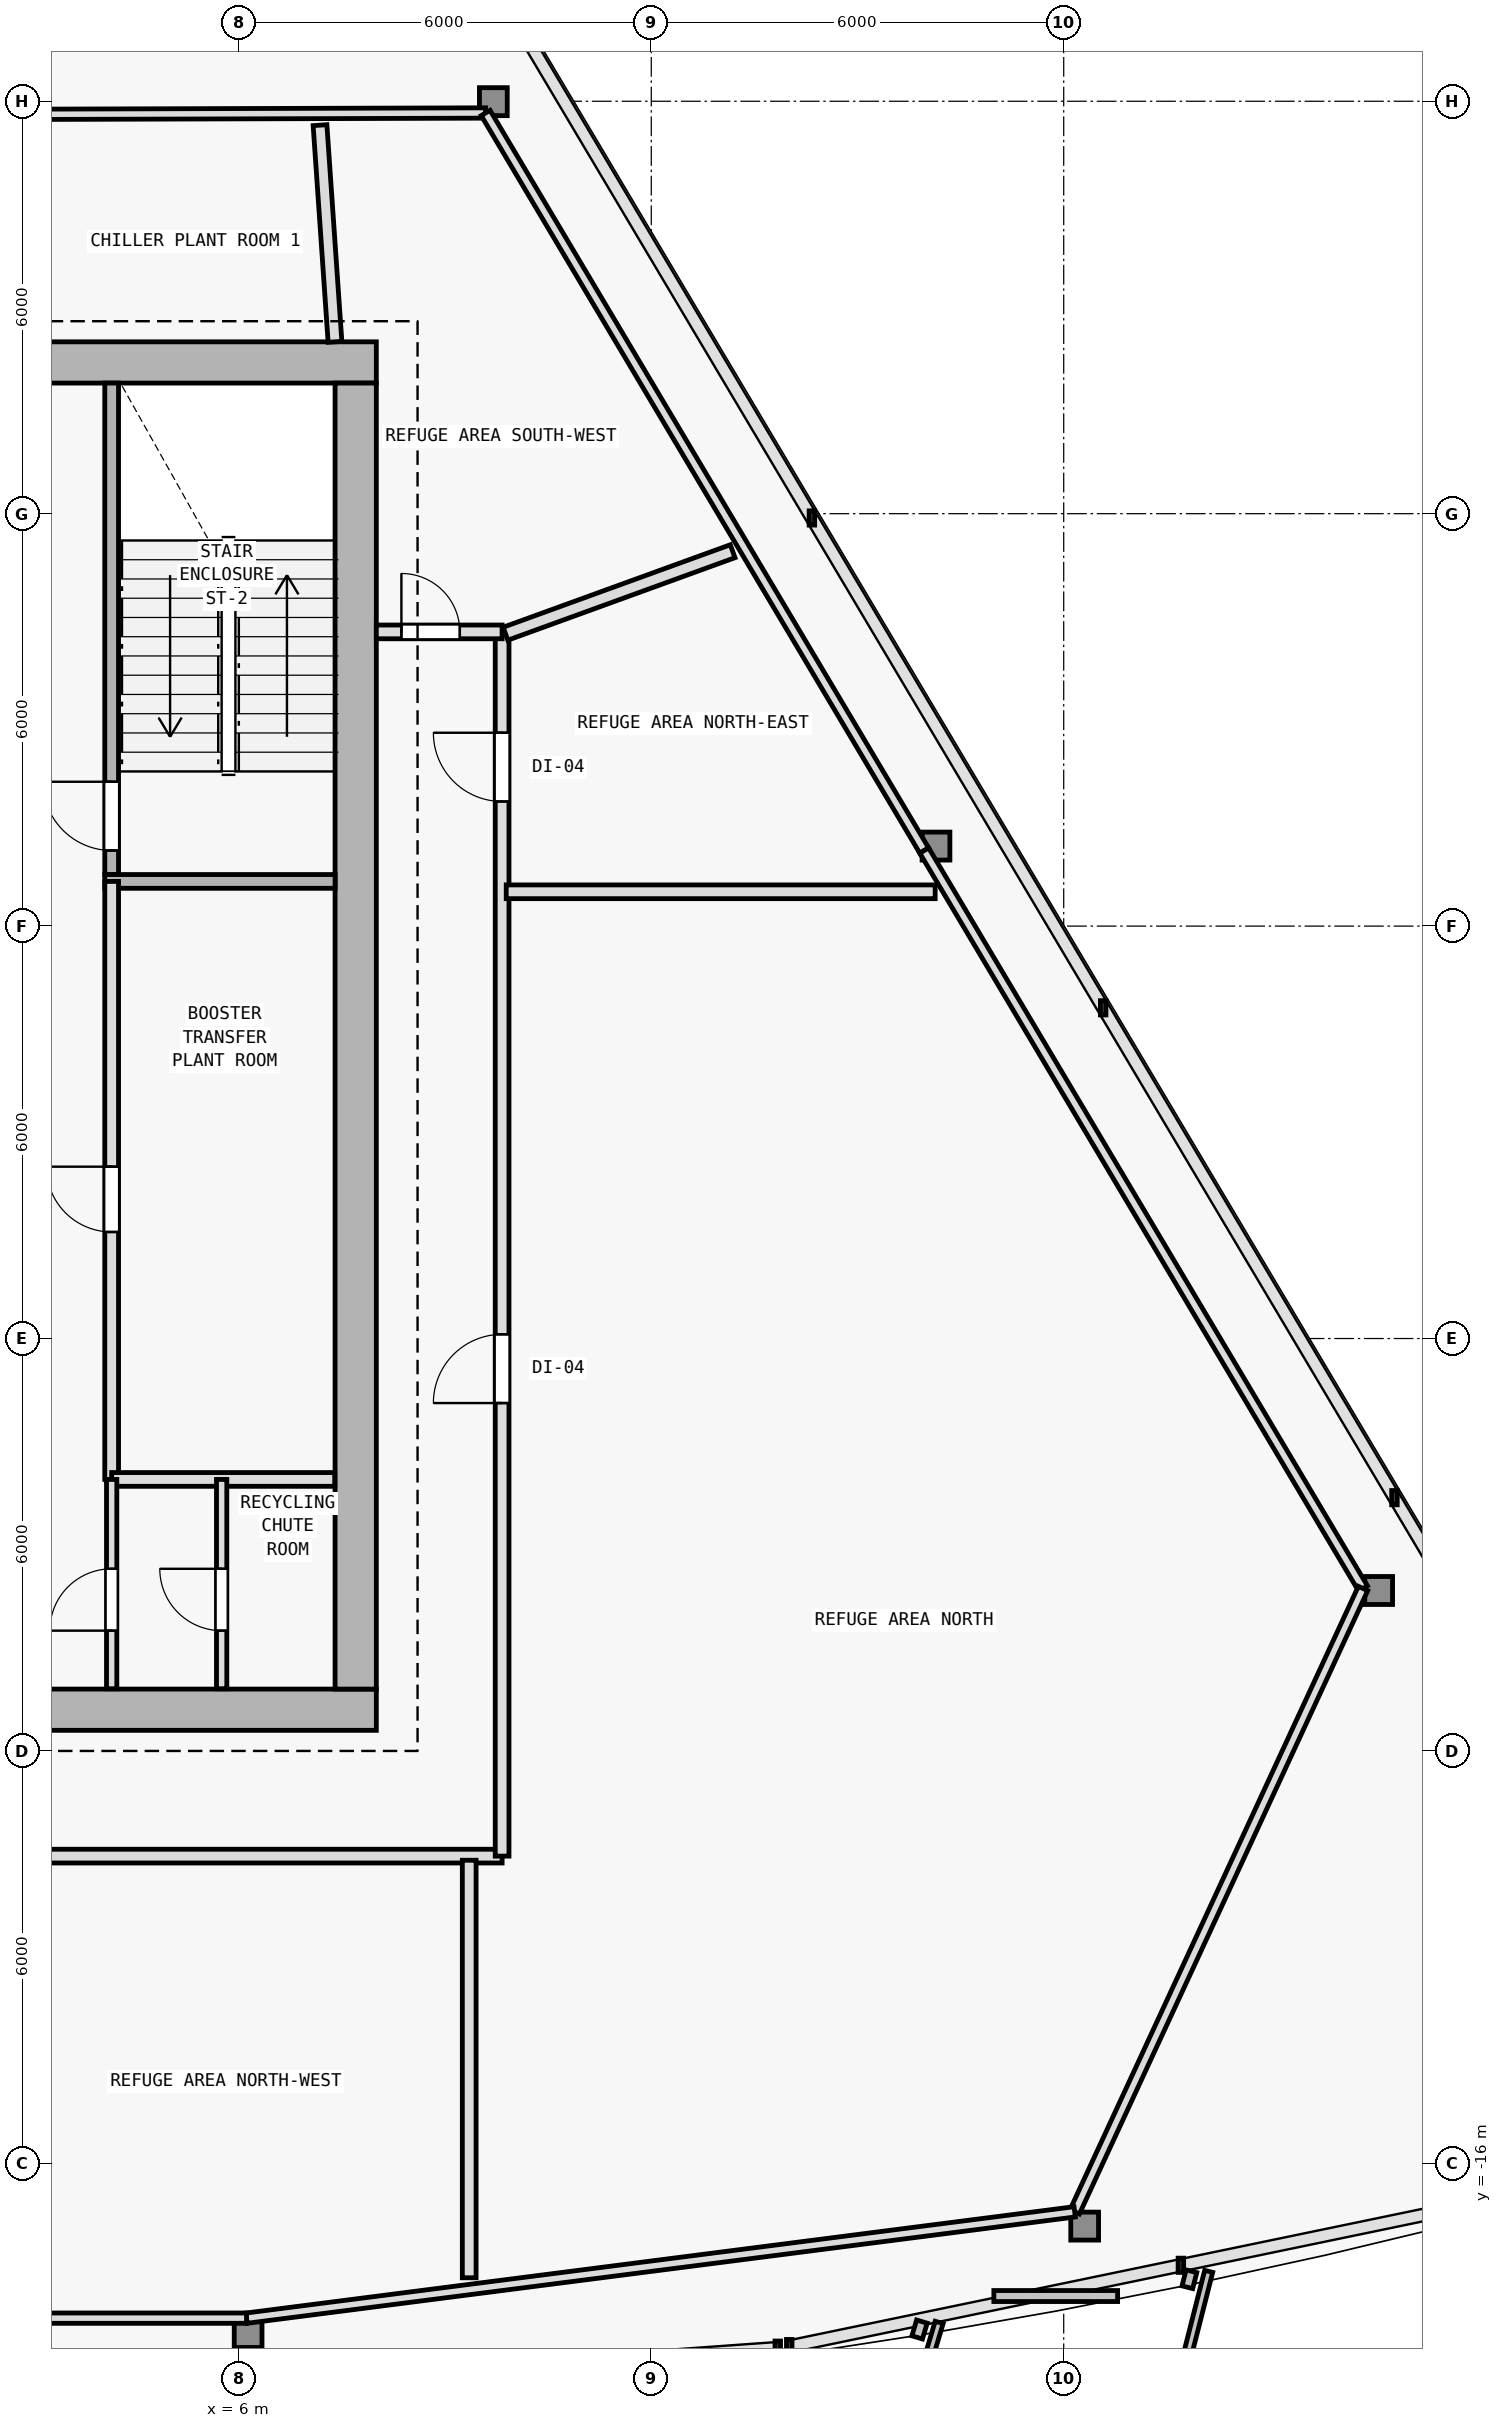
"""IFC4 building model, lengths in metres.
Left out: names, types, materials, properties, quantities, classifications, styles, units other than length and angle.
Written with IfcOpenShell. Run it as: python <this file> out.ifc"""

import sys

from ifc_helpers import new_model, si_unit, direction, frame, frame_2d, origin, origin_2d, place, context, subcontext, project, spatial, rectangle, i_section, extrude, element, fill, save


model = new_model("IFC4")
c1 = context("Model", 3, precision=1e-05, world=origin(), true_north=direction((0.0, 1.0)))
c2 = subcontext(c1, "Body", "Model", "MODEL_VIEW")
j1 = project(units=[si_unit("LENGTHUNIT", "METRE"), si_unit("PLANEANGLEUNIT", "RADIAN")], contexts=[c1])
p1 = place(None, origin())
s1 = spatial("IfcSite", under=j1, at=p1, CompositionType="ELEMENT")
p2 = place(p1, origin())
s2 = spatial("IfcBuilding", under=s1, at=p2, CompositionType="ELEMENT")
p3 = place(p2, frame((0.0, 0.0, 129.3)))
s3 = spatial("IfcBuildingStorey", under=s2, at=p3, CompositionType="ELEMENT", Elevation=129.3)
for number, where, z_axis, x_axis in (
    (1, (7.7, -9.4, 0.0), (0.0, 0.0, 1.0), (1.0, 0.0, 0.0)),
    (2, (7.7, 10.2, 0.0), (0.0, 0.0, 1.0), (1.0, 0.0, 0.0)),
    (3, (7.7, 0.4, 0.0), (0.0, 0.0, 1.0), (1.0, 0.0, 0.0)),
):
    element("IfcColumn", number, at=place(p3, frame(where, z_axis=z_axis, x_axis=x_axis)), inside=s3, PredefinedType="COLUMN", context=c2, shape_type="SweptSolid", body=[
        extrude(i_section(OverallWidth=0.409, OverallDepth=0.425, WebThickness=0.021, FlangeThickness=0.034, FilletRadius=0.015, at=origin_2d()), origin(), (0.0, 0.0, 1.0), 4.8),
    ])
p4 = place(p3, frame((6.135, -18.475, 0.005), z_axis=(-0.005197947592, 0.026448380393, 0.999636666252), x_axis=(-0.981229659911, -0.192842823335, 0.0)))
e4 = element("IfcColumn", 4, at=p4, inside=s3, PredefinedType="COLUMN", context=c2, shape_type="SweptSolid", body=[
    extrude(i_section(OverallWidth=0.404, OverallDepth=0.407, WebThickness=0.017, FlangeThickness=0.028, FilletRadius=0.015, at=origin_2d()), origin(), (0.0, 0.0, 1.0), 4.791),
])
p5 = place(p3, frame((18.305, -16.913, 0.005), z_axis=(-0.015439857484, 0.025121616302, 0.999565163056), x_axis=(-0.851954850327, -0.523615252838, 0.0)))
e5 = element("IfcColumn", 5, at=p5, inside=s3, PredefinedType="COLUMN", context=c2, shape_type="SweptSolid", body=[
    extrude(i_section(OverallWidth=0.404, OverallDepth=0.407, WebThickness=0.017, FlangeThickness=0.028, FilletRadius=0.015, at=origin_2d()), origin(), (0.0, 0.0, 1.0), 4.791),
])
p6 = place(p3, frame((22.582, -7.666, 0.005), z_axis=(-0.019569536318, 0.016206022264, 0.999677146928), x_axis=(-0.637813971185, -0.770190455771, 0.0)))
e6 = element("IfcColumn", 6, at=p6, inside=s3, PredefinedType="COLUMN", context=c2, shape_type="SweptSolid", body=[
    extrude(i_section(OverallWidth=0.404, OverallDepth=0.407, WebThickness=0.017, FlangeThickness=0.028, FilletRadius=0.015, at=origin_2d()), origin(), (0.0, 0.0, 1.0), 4.791),
])
p7 = place(p3, frame((16.142, 3.164, 0.005), z_axis=(-0.014170315402, 0.007187102416, 0.999873765893), x_axis=(-0.452339157861, -0.891845999187, 0.0)))
e7 = element("IfcColumn", 7, at=p7, inside=s3, PredefinedType="COLUMN", context=c2, shape_type="SweptSolid", body=[
    extrude(i_section(OverallWidth=0.404, OverallDepth=0.407, WebThickness=0.017, FlangeThickness=0.028, FilletRadius=0.015, at=origin_2d()), origin(), (0.0, 0.0, 1.0), 4.79),
])
p8 = place(p3, frame((9.702, 13.994, 0.005), z_axis=(-0.008767998861, -0.001937116027, 0.999959684076), x_axis=(0.215728093413, -0.976453475447, 0.0)))
e8 = element("IfcColumn", 8, at=p8, inside=s3, PredefinedType="COLUMN", context=c2, shape_type="SweptSolid", body=[
    extrude(i_section(OverallWidth=0.404, OverallDepth=0.407, WebThickness=0.017, FlangeThickness=0.028, FilletRadius=0.015, at=origin_2d()), origin(), (0.0, 0.0, 1.0), 4.789),
])
p9 = place(p3, frame((-8.0, -9.4, 0.0), z_axis=(0.0, 0.0, 1.0), x_axis=(1.0, 0.0, 0.0)))
e9 = element("IfcWall", 9, at=p9, inside=s3, PredefinedType="SHEAR", context=c2, shape_type="SweptSolid", body=[
    extrude(rectangle(XDim=16.0, YDim=0.6, at=frame_2d((8.0, 0.0))), origin(), (0.0, 0.0, 1.0), 4.5),
])
p10 = place(p9, frame((9.65, 0.0, 0.0)))
e10 = element("IfcOpeningElement", 10, at=p10, cuts=e9, PredefinedType="OPENING", context=c2, shape_type="SweptSolid", body=[
    extrude(rectangle(XDim=1.5, YDim=2.2, at=frame_2d((0.75, 1.1))), frame((0.0, 0.31, 0.0), z_axis=(0.0, -1.0, 0.0), x_axis=(1.0, 0.0, 0.0)), (0.0, 0.0, 1.0), 0.62),
])
p11 = place(p3, frame((8.0, 10.2, 0.0), z_axis=(0.0, 0.0, 1.0), x_axis=(-1.0, 0.0, 0.0)))
e11 = element("IfcWall", 11, at=p11, inside=s3, PredefinedType="SHEAR", context=c2, shape_type="SweptSolid", body=[
    extrude(rectangle(XDim=16.0, YDim=0.6, at=frame_2d((8.0, 0.0))), origin(), (0.0, 0.0, 1.0), 4.5),
])
p12 = place(p3, frame((7.7, 9.9, 0.0), z_axis=(0.0, 0.0, 1.0), x_axis=(0.0, -1.0, 0.0)))
e12 = element("IfcWall", 12, at=p12, inside=s3, PredefinedType="SHEAR", context=c2, shape_type="SweptSolid", body=[
    extrude(rectangle(XDim=19.0, YDim=0.6, at=frame_2d((9.5, 0.0))), origin(), (0.0, 0.0, 1.0), 4.5),
])
p13 = place(p3, frame((4.15, 2.75, 0.0), z_axis=(0.0, 0.0, 1.0), x_axis=(0.0, 1.0, 0.0)))
e13 = element("IfcWall", 13, at=p13, inside=s3, PredefinedType="SOLIDWALL", context=c2, shape_type="SweptSolid", body=[
    extrude(rectangle(XDim=7.15, YDim=0.2, at=frame_2d((3.575, 0.0))), origin(), (0.0, 0.0, 1.0), 4.5),
])
p14 = place(p13, frame((0.35, 0.0, 0.0)))
e14 = element("IfcOpeningElement", 14, at=p14, cuts=e13, PredefinedType="OPENING", context=c2, shape_type="SweptSolid", body=[
    extrude(rectangle(XDim=1.0, YDim=2.15, at=frame_2d((0.5, 1.075))), frame((0.0, 0.11, 0.0), z_axis=(0.0, -1.0, 0.0), x_axis=(1.0, 0.0, 0.0)), (0.0, 0.0, 1.0), 0.22),
])
p15 = place(p3, frame((4.05, 2.65, 0.0), z_axis=(0.0, 0.0, 1.0), x_axis=(1.0, 0.0, 0.0)))
e15 = element("IfcWall", 15, at=p15, inside=s3, PredefinedType="SOLIDWALL", context=c2, shape_type="SweptSolid", body=[
    extrude(rectangle(XDim=3.35, YDim=0.2, at=frame_2d((1.675, 0.0))), origin(), (0.0, 0.0, 1.0), 4.5),
])
p16 = place(p3, frame((4.15, -6.05, 0.0), z_axis=(0.0, 0.0, 1.0), x_axis=(0.0, 1.0, 0.0)))
e16 = element("IfcWall", 16, at=p16, inside=s3, PredefinedType="SOLIDWALL", context=c2, shape_type="SweptSolid", body=[
    extrude(rectangle(XDim=8.7, YDim=0.2, at=frame_2d((4.35, 0.0))), origin(), (0.0, 0.0, 1.0), 4.5),
])
p17 = place(p16, frame((3.6, 0.0, 0.0)))
e17 = element("IfcOpeningElement", 17, at=p17, cuts=e16, PredefinedType="OPENING", context=c2, shape_type="SweptSolid", body=[
    extrude(rectangle(XDim=0.95, YDim=2.1, at=frame_2d((0.475, 1.05))), frame((0.0, 0.11, 0.0), z_axis=(0.0, -1.0, 0.0), x_axis=(1.0, 0.0, 0.0)), (0.0, 0.0, 1.0), 0.22),
])
p18 = place(p3, frame((4.15, -6.05, 0.0), z_axis=(0.0, 0.0, 1.0), x_axis=(1.0, 0.0, 0.0)))
e18 = element("IfcWall", 18, at=p18, inside=s3, PredefinedType="SOLIDWALL", context=c2, shape_type="SweptSolid", body=[
    extrude(rectangle(XDim=3.245, YDim=0.2, at=frame_2d((1.623, 0.0))), origin(), (0.0, 0.0, 1.0), 4.5),
])
p19 = place(p3, frame((4.15, -9.095, 0.0), z_axis=(0.0, 0.0, 1.0), x_axis=(0.0, 1.0, 0.0)))
e19 = element("IfcWall", 19, at=p19, inside=s3, PredefinedType="PARTITIONING", context=c2, shape_type="SweptSolid", body=[
    extrude(rectangle(XDim=3.045, YDim=0.15, at=frame_2d((1.522, 0.0))), origin(), (0.0, 0.0, 1.0), 4.5),
])
p20 = place(p19, frame((0.845, 0.0, 0.0)))
e20 = element("IfcOpeningElement", 20, at=p20, cuts=e19, PredefinedType="OPENING", context=c2, shape_type="SweptSolid", body=[
    extrude(rectangle(XDim=0.9, YDim=2.1, at=frame_2d((0.45, 1.05))), frame((0.0, 0.085, 0.0), z_axis=(0.0, -1.0, 0.0), x_axis=(1.0, 0.0, 0.0)), (0.0, 0.0, 1.0), 0.17),
])
p21 = place(p3, frame((5.75, -9.095, 0.0), z_axis=(0.0, 0.0, 1.0), x_axis=(0.0, 1.0, 0.0)))
e21 = element("IfcWall", 21, at=p21, inside=s3, PredefinedType="PARTITIONING", context=c2, shape_type="SweptSolid", body=[
    extrude(rectangle(XDim=3.045, YDim=0.15, at=frame_2d((1.522, 0.0))), origin(), (0.0, 0.0, 1.0), 4.5),
])
p22 = place(p21, frame((0.845, 0.0, 0.0)))
e22 = element("IfcOpeningElement", 22, at=p22, cuts=e21, PredefinedType="OPENING", context=c2, shape_type="SweptSolid", body=[
    extrude(rectangle(XDim=0.9, YDim=2.1, at=frame_2d((0.45, 1.05))), frame((0.0, 0.085, 0.0), z_axis=(0.0, -1.0, 0.0), x_axis=(1.0, 0.0, 0.0)), (0.0, 0.0, 1.0), 0.17),
])
p23 = place(p3, frame((-7.004, 13.781, 0.0), z_axis=(0.0, 0.0, 1.0), x_axis=(0.999995800217, 0.002898197411, 0.0)))
e23 = element("IfcWall", 23, at=p23, inside=s3, PredefinedType="PARTITIONING", context=c2, shape_type="SweptSolid", body=[
    extrude(rectangle(XDim=16.595, YDim=0.15, at=frame_2d((8.297, 0.0))), origin(), (0.0, 0.0, 1.0), 4.035),
])
p24 = place(p3, frame((9.591, 13.829, 0.0), z_axis=(0.0, 0.0, 1.0), x_axis=(0.511092184869, -0.859525903371, 0.0)))
e24 = element("IfcWall", 24, at=p24, inside=s3, PredefinedType="PARTITIONING", context=c2, shape_type="SweptSolid", body=[
    extrude(rectangle(XDim=12.483, YDim=0.15, at=frame_2d((6.242, 0.0))), origin(), (0.0, 0.0, 1.0), 4.035),
])
p25 = place(p3, frame((15.971, 3.099, 0.0), z_axis=(0.0, 0.0, 1.0), x_axis=(0.511102713459, -0.859519642762, 0.0)))
e25 = element("IfcWall", 25, at=p25, inside=s3, PredefinedType="PARTITIONING", context=c2, shape_type="SweptSolid", body=[
    extrude(rectangle(XDim=12.49, YDim=0.15, at=frame_2d((6.245, 0.0))), origin(), (0.0, 0.0, 1.0), 3.855),
])
p26 = place(p3, frame((22.354, -7.636, 0.0), z_axis=(0.0, 0.0, 1.0), x_axis=(-0.4197971313, -0.907617963987, 0.0)))
e26 = element("IfcWall", 26, at=p26, inside=s3, PredefinedType="PARTITIONING", context=c2, shape_type="SweptSolid", body=[
    extrude(rectangle(XDim=9.992, YDim=0.15, at=frame_2d((4.996, 0.0))), origin(), (0.0, 0.0, 1.0), 3.855),
])
p27 = place(p3, frame((18.16, -16.705, 0.0), z_axis=(0.0, 0.0, 1.0), x_axis=(-0.991860198752, -0.127331638379, 0.0)))
e27 = element("IfcWall", 27, at=p27, inside=s3, PredefinedType="PARTITIONING", context=c2, shape_type="SweptSolid", body=[
    extrude(rectangle(XDim=12.146, YDim=0.15, at=frame_2d((6.073, 0.0))), origin(), (0.0, 0.0, 1.0), 3.925),
])
p28 = place(p3, frame((6.112, -18.252, 0.0), z_axis=(0.0, 0.0, 1.0), x_axis=(-1.0, 0.0, 0.0)))
e28 = element("IfcWall", 28, at=p28, inside=s3, PredefinedType="PARTITIONING", context=c2, shape_type="SweptSolid", body=[
    extrude(rectangle(XDim=12.225, YDim=0.15, at=frame_2d((6.112, 0.0))), origin(), (0.0, 0.0, 1.0), 4.035),
])
p29 = place(p3, frame((-9.83, -11.53, 0.0), z_axis=(0.0, 0.0, 1.0), x_axis=(1.0, 0.0, 0.0)))
e29 = element("IfcWall", 29, at=p29, inside=s3, PredefinedType="SOLIDWALL", context=c2, shape_type="SweptSolid", body=[
    extrude(rectangle(XDim=19.66, YDim=0.2, at=frame_2d((9.83, 0.0))), origin(), (0.0, 0.0, 1.0), 3.875),
])
p30 = place(p29, frame((1.883, 0.0, 0.0)))
e30 = element("IfcOpeningElement", 30, at=p30, cuts=e29, PredefinedType="OPENING", context=c2, shape_type="SweptSolid", body=[
    extrude(rectangle(XDim=1.0, YDim=2.15, at=frame_2d((0.5, 1.075))), frame((0.0, 0.11, 0.0), z_axis=(0.0, -1.0, 0.0), x_axis=(1.0, 0.0, 0.0)), (0.0, 0.0, 1.0), 0.22),
])
p31 = place(p29, frame((11.397, 0.0, 0.0)))
e31 = element("IfcOpeningElement", 31, at=p31, cuts=e29, PredefinedType="OPENING", context=c2, shape_type="SweptSolid", body=[
    extrude(rectangle(XDim=1.0, YDim=2.15, at=frame_2d((0.5, 1.075))), frame((0.0, 0.11, 0.0), z_axis=(0.0, -1.0, 0.0), x_axis=(1.0, 0.0, 0.0)), (0.0, 0.0, 1.0), 0.22),
])
p32 = place(p3, frame((9.83, -11.53, 0.0), z_axis=(0.0, 0.0, 1.0), x_axis=(0.0, 1.0, 0.0)))
e32 = element("IfcWall", 32, at=p32, inside=s3, PredefinedType="SOLIDWALL", context=c2, shape_type="SweptSolid", body=[
    extrude(rectangle(XDim=17.81, YDim=0.2, at=frame_2d((8.905, 0.0))), origin(), (0.0, 0.0, 1.0), 3.855),
])
p33 = place(p32, frame((6.591, 0.0, 0.0)))
e33 = element("IfcOpeningElement", 33, at=p33, cuts=e32, PredefinedType="OPENING", context=c2, shape_type="SweptSolid", body=[
    extrude(rectangle(XDim=1.0, YDim=2.15, at=frame_2d((0.5, 1.075))), frame((0.0, 0.11, 0.0), z_axis=(0.0, -1.0, 0.0), x_axis=(1.0, 0.0, 0.0)), (0.0, 0.0, 1.0), 0.22),
])
p34 = place(p32, frame((15.343, 0.0, 0.0)))
e34 = element("IfcOpeningElement", 34, at=p34, cuts=e32, PredefinedType="OPENING", context=c2, shape_type="SweptSolid", body=[
    extrude(rectangle(XDim=1.0, YDim=2.15, at=frame_2d((0.5, 1.075))), frame((0.0, 0.11, 0.0), z_axis=(0.0, -1.0, 0.0), x_axis=(1.0, 0.0, 0.0)), (0.0, 0.0, 1.0), 0.22),
])
p35 = place(p3, frame((8.0, 6.28, 0.0), z_axis=(0.0, 0.0, 1.0), x_axis=(1.0, 0.0, 0.0)))
e35 = element("IfcWall", 35, at=p35, inside=s3, PredefinedType="SOLIDWALL", context=c2, shape_type="SweptSolid", body=[
    extrude(rectangle(XDim=1.83, YDim=0.2, at=frame_2d((0.915, 0.0))), origin(), (0.0, 0.0, 1.0), 4.5),
])
p36 = place(p35, frame((0.365, 0.0, 0.0)))
e36 = element("IfcOpeningElement", 36, at=p36, cuts=e35, PredefinedType="OPENING", context=c2, shape_type="SweptSolid", body=[
    extrude(rectangle(XDim=0.85, YDim=2.1, at=frame_2d((0.425, 1.05))), frame((0.0, 0.11, 0.0), z_axis=(0.0, -1.0, 0.0), x_axis=(1.0, 0.0, 0.0)), (0.0, 0.0, 1.0), 0.22),
])
p37 = place(p3, frame((9.351, -11.59, 0.0), z_axis=(0.0, 0.0, 1.0), x_axis=(0.0, -1.0, 0.0)))
e37 = element("IfcWall", 37, at=p37, inside=s3, PredefinedType="SOLIDWALL", context=c2, shape_type="SweptSolid", body=[
    extrude(rectangle(XDim=6.074, YDim=0.2, at=frame_2d((3.037, 0.0))), origin(), (0.0, 0.0, 1.0), 3.975),
])
p38 = place(p3, frame((9.89, 2.499, 0.0), z_axis=(0.0, 0.0, 1.0), x_axis=(1.0, 0.0, 0.0)))
e38 = element("IfcWall", 38, at=p38, inside=s3, PredefinedType="SOLIDWALL", context=c2, shape_type="SweptSolid", body=[
    extrude(rectangle(XDim=6.24, YDim=0.2, at=frame_2d((3.12, 0.0))), origin(), (0.0, 0.0, 1.0), 4.115),
])
p39 = place(p3, frame((9.879, 6.253, 0.0), z_axis=(0.0, 0.0, 1.0), x_axis=(0.939939302956, 0.341341627638, 0.0)))
e39 = element("IfcWall", 39, at=p39, inside=s3, PredefinedType="SOLIDWALL", context=c2, shape_type="SweptSolid", body=[
    extrude(rectangle(XDim=3.516, YDim=0.2, at=frame_2d((1.758, 0.0))), origin(), (0.0, 0.0, 1.0), 4.115),
])
p40 = place(p3, frame((7.399, 10.5, 0.0), z_axis=(0.0, 0.0, 1.0), x_axis=(-0.06892407576, 0.99762190823, 0.0)))
e40 = element("IfcWall", 40, at=p40, inside=s3, PredefinedType="SOLIDWALL", context=c2, shape_type="SweptSolid", body=[
    extrude(rectangle(XDim=3.16, YDim=0.2, at=frame_2d((1.58, 0.0))), origin(), (0.0, 0.0, 1.0), 4.5),
])
p41 = place(p14, origin())
e41 = element("IfcDoor", 41, at=p41, inside=s3, OperationType="SINGLE_SWING_RIGHT", PredefinedType="DOOR", context=c2, shape_type="SweptSolid", body=[
    extrude(rectangle(XDim=1.0, YDim=2.15, at=frame_2d((0.5, 1.075))), frame((0.0, 0.025, 0.0), z_axis=(0.0, -1.0, 0.0), x_axis=(1.0, 0.0, 0.0)), (0.0, 0.0, 1.0), 0.05),
])
fill(e14, e41)
p42 = place(p17, origin())
e42 = element("IfcDoor", 42, at=p42, inside=s3, OperationType="SINGLE_SWING_RIGHT", PredefinedType="DOOR", context=c2, shape_type="SweptSolid", body=[
    extrude(rectangle(XDim=0.95, YDim=2.1, at=frame_2d((0.475, 1.05))), frame((0.0, 0.025, 0.0), z_axis=(0.0, -1.0, 0.0), x_axis=(1.0, 0.0, 0.0)), (0.0, 0.0, 1.0), 0.05),
])
fill(e17, e42)
p43 = place(p20, origin())
e43 = element("IfcDoor", 43, at=p43, inside=s3, OperationType="SINGLE_SWING_LEFT", PredefinedType="DOOR", context=c2, shape_type="SweptSolid", body=[
    extrude(rectangle(XDim=0.9, YDim=2.1, at=frame_2d((0.45, 1.05))), frame((0.0, 0.025, 0.0), z_axis=(0.0, -1.0, 0.0), x_axis=(1.0, 0.0, 0.0)), (0.0, 0.0, 1.0), 0.05),
])
fill(e20, e43)
p44 = place(p22, origin())
e44 = element("IfcDoor", 44, at=p44, inside=s3, OperationType="SINGLE_SWING_RIGHT", PredefinedType="DOOR", context=c2, shape_type="SweptSolid", body=[
    extrude(rectangle(XDim=0.9, YDim=2.1, at=frame_2d((0.45, 1.05))), frame((0.0, 0.025, 0.0), z_axis=(0.0, -1.0, 0.0), x_axis=(1.0, 0.0, 0.0)), (0.0, 0.0, 1.0), 0.05),
])
fill(e22, e44)
p45 = place(p33, origin())
e45 = element("IfcDoor", 45, at=p45, inside=s3, OperationType="SINGLE_SWING_LEFT", PredefinedType="DOOR", context=c2, shape_type="SweptSolid", body=[
    extrude(rectangle(XDim=1.0, YDim=2.15, at=frame_2d((0.5, 1.075))), frame((0.0, 0.025, 0.0), z_axis=(0.0, -1.0, 0.0), x_axis=(1.0, 0.0, 0.0)), (0.0, 0.0, 1.0), 0.05),
])
fill(e33, e45)
p46 = place(p34, origin())
e46 = element("IfcDoor", 46, at=p46, inside=s3, OperationType="SINGLE_SWING_RIGHT", PredefinedType="DOOR", context=c2, shape_type="SweptSolid", body=[
    extrude(rectangle(XDim=1.0, YDim=2.15, at=frame_2d((0.5, 1.075))), frame((0.0, 0.025, 0.0), z_axis=(0.0, -1.0, 0.0), x_axis=(1.0, 0.0, 0.0)), (0.0, 0.0, 1.0), 0.05),
])
fill(e34, e46)
p47 = place(p36, origin())
e47 = element("IfcDoor", 47, at=p47, inside=s3, OperationType="SINGLE_SWING_LEFT", PredefinedType="DOOR", context=c2, shape_type="SweptSolid", body=[
    extrude(rectangle(XDim=0.85, YDim=2.1, at=frame_2d((0.425, 1.05))), frame((0.0, 0.025, 0.0), z_axis=(0.0, -1.0, 0.0), x_axis=(1.0, 0.0, 0.0)), (0.0, 0.0, 1.0), 0.05),
])
fill(e36, e47)
save(model, sys.argv[1])
